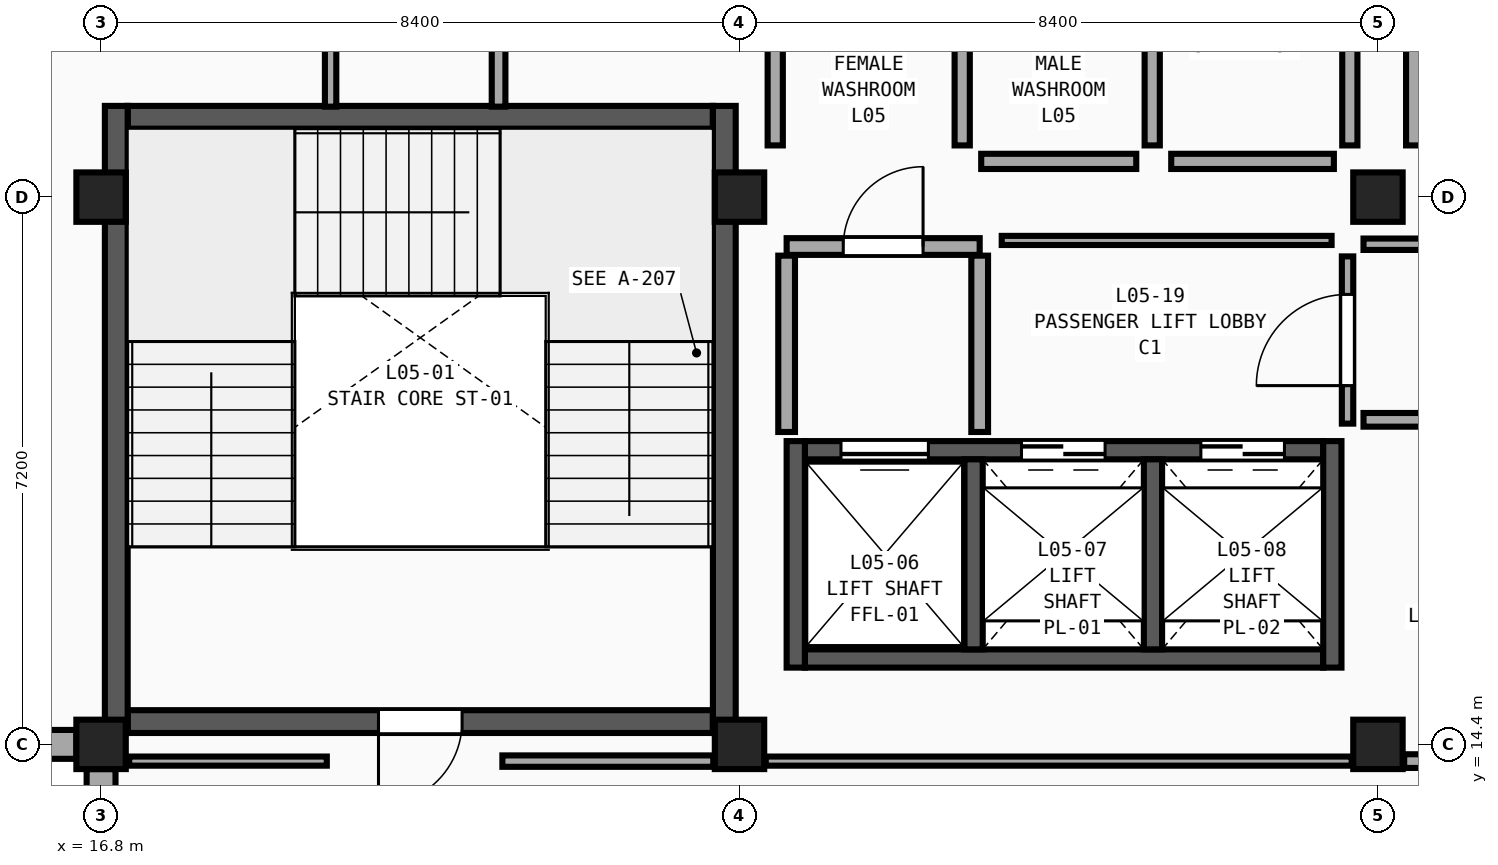
"""IFC4 building model, lengths in metres.
Left out: names, types, materials, properties, quantities, classifications, styles, units other than length and angle.
Written with IfcOpenShell. Run it as: python <this file> out.ifc"""

import sys

from ifc_helpers import new_model, si_unit, direction, frame, frame_2d, origin, origin_2d, place, context, subcontext, project, spatial, rectangle, extrude, element, fill, save


model = new_model("IFC4")
c1 = context("Model", 3, precision=1e-05, world=origin(), true_north=direction((0.0, 1.0)))
c2 = subcontext(c1, "Body", "Model", "MODEL_VIEW")
j1 = project(units=[si_unit("LENGTHUNIT", "METRE"), si_unit("PLANEANGLEUNIT", "RADIAN")], contexts=[c1])
p1 = place(None, origin())
s1 = spatial("IfcSite", under=j1, at=p1, CompositionType="ELEMENT")
p2 = place(p1, origin())
s2 = spatial("IfcBuilding", under=s1, at=p2, CompositionType="ELEMENT")
p3 = place(p2, frame((0.0, 0.0, 23.4)))
s3 = spatial("IfcBuildingStorey", under=s2, at=p3, CompositionType="ELEMENT", Elevation=23.4)
for number, where, z_axis, x_axis in (
    (1, (16.8, 14.4, 0.0), (0.0, 0.0, 1.0), (1.0, 0.0, 0.0)),
    (2, (16.8, 21.6, 0.0), (0.0, 0.0, 1.0), (1.0, 0.0, 0.0)),
    (3, (25.2, 14.4, 0.0), (0.0, 0.0, 1.0), (1.0, 0.0, 0.0)),
    (4, (25.2, 21.6, 0.0), (0.0, 0.0, 1.0), (1.0, 0.0, 0.0)),
    (5, (33.6, 14.4, 0.0), (0.0, 0.0, 1.0), (1.0, 0.0, 0.0)),
    (6, (33.6, 21.6, 0.0), (0.0, 0.0, 1.0), (1.0, 0.0, 0.0)),
):
    element("IfcColumn", number, at=place(p3, frame(where, z_axis=z_axis, x_axis=x_axis)), inside=s3, PredefinedType="COLUMN", context=c2, shape_type="SweptSolid", body=[
        extrude(rectangle(XDim=0.65, YDim=0.65, at=origin_2d()), origin(), (0.0, 0.0, 1.0), 4.5),
    ])
p4 = place(p3, frame((16.475, 14.4, 0.0), z_axis=(0.0, 0.0, 1.0), x_axis=(-1.0, 0.0, 0.0)))
e7 = element("IfcWall", 7, at=p4, inside=s3, PredefinedType="SOLIDWALL", context=c2, shape_type="SweptSolid", body=[
    extrude(rectangle(XDim=7.75, YDim=0.38, at=frame_2d((3.875, 0.0))), origin(), (0.0, 0.0, 1.0), 3.66),
])
p5 = place(p4, frame((1.37, 0.0, 0.75)))
e8 = element("IfcOpeningElement", 8, at=p5, cuts=e7, PredefinedType="OPENING", context=c2, shape_type="SweptSolid", body=[
    extrude(rectangle(XDim=1.6, YDim=1.9, at=frame_2d((0.8, 0.95))), frame((0.0, 0.21, 0.0), z_axis=(0.0, -1.0, 0.0), x_axis=(1.0, 0.0, 0.0)), (0.0, 0.0, 1.0), 0.42),
])
p6 = place(p4, frame((4.68, 0.0, 0.75)))
e9 = element("IfcOpeningElement", 9, at=p6, cuts=e7, PredefinedType="OPENING", context=c2, shape_type="SweptSolid", body=[
    extrude(rectangle(XDim=1.8, YDim=1.9, at=frame_2d((0.9, 0.95))), frame((0.0, 0.21, 0.0), z_axis=(0.0, -1.0, 0.0), x_axis=(1.0, 0.0, 0.0)), (0.0, 0.0, 1.0), 0.42),
])
p7 = place(p3, frame((16.8, 7.525, 0.0), z_axis=(0.0, 0.0, 1.0), x_axis=(0.0, 1.0, 0.0)))
e10 = element("IfcWall", 10, at=p7, inside=s3, PredefinedType="SOLIDWALL", context=c2, shape_type="SweptSolid", body=[
    extrude(rectangle(XDim=6.55, YDim=0.38, at=frame_2d((3.275, 0.0))), origin(), (0.0, 0.0, 1.0), 3.66),
])
p8 = place(p7, frame((1.034, 0.0, 0.75)))
e11 = element("IfcOpeningElement", 11, at=p8, cuts=e10, PredefinedType="OPENING", context=c2, shape_type="SweptSolid", body=[
    extrude(rectangle(XDim=1.6, YDim=2.08, at=frame_2d((0.8, 1.04))), frame((0.0, 0.21, 0.0), z_axis=(0.0, -1.0, 0.0), x_axis=(1.0, 0.0, 0.0)), (0.0, 0.0, 1.0), 0.42),
])
p9 = place(p7, frame((3.816, 0.0, 0.75)))
e12 = element("IfcOpeningElement", 12, at=p9, cuts=e10, PredefinedType="OPENING", context=c2, shape_type="SweptSolid", body=[
    extrude(rectangle(XDim=1.8, YDim=2.08, at=frame_2d((0.9, 1.04))), frame((0.0, 0.21, 0.0), z_axis=(0.0, -1.0, 0.0), x_axis=(1.0, 0.0, 0.0)), (0.0, 0.0, 1.0), 0.42),
])
p10 = place(p3, frame((24.85, 14.7, 0.0), z_axis=(0.0, 0.0, 1.0), x_axis=(-1.0, 0.0, 0.0)))
e13 = element("IfcWall", 13, at=p10, inside=s3, PredefinedType="SHEAR", context=c2, shape_type="SweptSolid", body=[
    extrude(rectangle(XDim=7.7, YDim=0.3, at=frame_2d((3.85, 0.0))), origin(), (0.0, 0.0, 1.0), 4.5),
])
p11 = place(p10, frame((3.3, 0.0, 0.0)))
e14 = element("IfcOpeningElement", 14, at=p11, cuts=e13, PredefinedType="OPENING", context=c2, shape_type="SweptSolid", body=[
    extrude(rectangle(XDim=1.1, YDim=2.2, at=frame_2d((0.55, 1.1))), frame((0.0, 0.17, 0.0), z_axis=(0.0, -1.0, 0.0), x_axis=(1.0, 0.0, 0.0)), (0.0, 0.0, 1.0), 0.34),
])
p12 = place(p3, frame((17.15, 22.65, 0.0), z_axis=(0.0, 0.0, 1.0), x_axis=(1.0, 0.0, 0.0)))
e15 = element("IfcWall", 15, at=p12, inside=s3, PredefinedType="SHEAR", context=c2, shape_type="SweptSolid", body=[
    extrude(rectangle(XDim=7.7, YDim=0.3, at=frame_2d((3.85, 0.0))), origin(), (0.0, 0.0, 1.0), 4.5),
])
for number, where, z_axis, x_axis in (
    (16, (17.0, 22.8, 0.0), (0.0, 0.0, 1.0), (0.0, -1.0, 0.0)),
    (17, (25.0, 14.55, 0.0), (0.0, 0.0, 1.0), (0.0, 1.0, 0.0)),
):
    element("IfcWall", number, at=place(p3, frame(where, z_axis=z_axis, x_axis=x_axis)), inside=s3, PredefinedType="SHEAR", context=c2, shape_type="SweptSolid", body=[
        extrude(rectangle(XDim=8.25, YDim=0.3, at=frame_2d((4.125, 0.0))), origin(), (0.0, 0.0, 1.0), 4.5),
    ])
p13 = place(p3, frame((32.88, 18.27, 0.0), z_axis=(0.0, 0.0, 1.0), x_axis=(-1.0, 0.0, 0.0)))
e18 = element("IfcWall", 18, at=p13, inside=s3, PredefinedType="SHEAR", context=c2, shape_type="SweptSolid", body=[
    extrude(rectangle(XDim=6.82, YDim=0.24, at=frame_2d((3.41, 0.0))), origin(), (0.0, 0.0, 1.0), 4.21),
])
p14 = place(p13, frame((5.195, 0.0, 0.0)))
e19 = element("IfcOpeningElement", 19, at=p14, cuts=e18, PredefinedType="OPENING", context=c2, shape_type="SweptSolid", body=[
    extrude(rectangle(XDim=1.15, YDim=2.25, at=frame_2d((0.575, 1.125))), frame((0.0, 0.14, 0.0), z_axis=(0.0, -1.0, 0.0), x_axis=(1.0, 0.0, 0.0)), (0.0, 0.0, 1.0), 0.28),
])
p15 = place(p13, frame((2.87, 0.0, 0.0)))
e20 = element("IfcOpeningElement", 20, at=p15, cuts=e18, PredefinedType="OPENING", context=c2, shape_type="SweptSolid", body=[
    extrude(rectangle(XDim=1.1, YDim=2.2, at=frame_2d((0.55, 1.1))), frame((0.0, 0.14, 0.0), z_axis=(0.0, -1.0, 0.0), x_axis=(1.0, 0.0, 0.0)), (0.0, 0.0, 1.0), 0.28),
])
p16 = place(p13, frame((0.51, 0.0, 0.0)))
e21 = element("IfcOpeningElement", 21, at=p16, cuts=e18, PredefinedType="OPENING", context=c2, shape_type="SweptSolid", body=[
    extrude(rectangle(XDim=1.1, YDim=2.2, at=frame_2d((0.55, 1.1))), frame((0.0, 0.14, 0.0), z_axis=(0.0, -1.0, 0.0), x_axis=(1.0, 0.0, 0.0)), (0.0, 0.0, 1.0), 0.28),
])
p17 = place(p3, frame((26.06, 15.53, 0.0), z_axis=(0.0, 0.0, 1.0), x_axis=(1.0, 0.0, 0.0)))
e22 = element("IfcWall", 22, at=p17, inside=s3, PredefinedType="SHEAR", context=c2, shape_type="SweptSolid", body=[
    extrude(rectangle(XDim=6.82, YDim=0.24, at=frame_2d((3.41, 0.0))), origin(), (0.0, 0.0, 1.0), 4.21),
])
for number, where, z_axis, x_axis in (
    (23, (25.94, 18.39, 0.0), (0.0, 0.0, 1.0), (0.0, -1.0, 0.0)),
    (24, (33.0, 15.41, 0.0), (0.0, 0.0, 1.0), (0.0, 1.0, 0.0)),
):
    element("IfcWall", number, at=place(p3, frame(where, z_axis=z_axis, x_axis=x_axis)), inside=s3, PredefinedType="SHEAR", context=c2, shape_type="SweptSolid", body=[
        extrude(rectangle(XDim=2.98, YDim=0.24, at=frame_2d((1.49, 0.0))), origin(), (0.0, 0.0, 1.0), 4.21),
    ])
for number, where, z_axis, x_axis in (
    (25, (28.28, 15.65, 0.0), (0.0, 0.0, 1.0), (0.0, 1.0, 0.0)),
    (26, (30.64, 15.65, 0.0), (0.0, 0.0, 1.0), (0.0, 1.0, 0.0)),
):
    element("IfcWall", number, at=place(p3, frame(where, z_axis=z_axis, x_axis=x_axis)), inside=s3, PredefinedType="SHEAR", context=c2, shape_type="SweptSolid", body=[
        extrude(rectangle(XDim=2.5, YDim=0.24, at=frame_2d((1.25, 0.0))), origin(), (0.0, 0.0, 1.0), 4.21),
    ])
p18 = place(p3, frame((25.82, 20.95, 0.0), z_axis=(0.0, 0.0, 1.0), x_axis=(1.0, 0.0, 0.0)))
e27 = element("IfcWall", 27, at=p18, inside=s3, PredefinedType="SOLIDWALL", context=c2, shape_type="SweptSolid", body=[
    extrude(rectangle(XDim=2.54, YDim=0.22, at=frame_2d((1.27, 0.0))), origin(), (0.0, 0.0, 1.0), 3.76),
])
p19 = place(p18, frame((0.745, 0.0, 0.0)))
e28 = element("IfcOpeningElement", 28, at=p19, cuts=e27, PredefinedType="OPENING", context=c2, shape_type="SweptSolid", body=[
    extrude(rectangle(XDim=1.05, YDim=2.15, at=frame_2d((0.525, 1.075))), frame((0.0, 0.13, 0.0), z_axis=(0.0, -1.0, 0.0), x_axis=(1.0, 0.0, 0.0)), (0.0, 0.0, 1.0), 0.26),
])
for number, where, z_axis, x_axis in (
    (29, (25.82, 18.51, 0.0), (0.0, 0.0, 1.0), (0.0, 1.0, 0.0)),
    (30, (28.36, 18.51, 0.0), (0.0, 0.0, 1.0), (0.0, 1.0, 0.0)),
):
    element("IfcWall", number, at=place(p3, frame(where, z_axis=z_axis, x_axis=x_axis)), inside=s3, PredefinedType="SOLIDWALL", context=c2, shape_type="SweptSolid", body=[
        extrude(rectangle(XDim=2.32, YDim=0.22, at=frame_2d((1.16, 0.0))), origin(), (0.0, 0.0, 1.0), 4.21),
    ])
p20 = place(p3, frame((22.08, 14.18, 0.0), z_axis=(0.0, 0.0, 1.0), x_axis=(1.0, 0.0, 0.0)))
e31 = element("IfcWall", 31, at=p20, inside=s3, PredefinedType="PARTITIONING", context=c2, shape_type="SweptSolid", body=[
    extrude(rectangle(XDim=2.775, YDim=0.15, at=frame_2d((1.387, 0.0))), origin(), (0.0, 0.0, 1.0), 3.76),
])
p21 = place(p3, frame((25.545, 14.18, 0.0), z_axis=(0.0, 0.0, 1.0), x_axis=(1.0, 0.0, 0.0)))
e32 = element("IfcWall", 32, at=p21, inside=s3, PredefinedType="PARTITIONING", context=c2, shape_type="SweptSolid", body=[
    extrude(rectangle(XDim=7.71, YDim=0.12, at=frame_2d((3.855, 0.0))), origin(), (0.0, 0.0, 1.0), 3.76),
])
p22 = place(p3, frame((33.945, 14.18, 0.0), z_axis=(0.0, 0.0, 1.0), x_axis=(1.0, 0.0, 0.0)))
e33 = element("IfcWall", 33, at=p22, inside=s3, PredefinedType="PARTITIONING", context=c2, shape_type="SweptSolid", body=[
    extrude(rectangle(XDim=2.625, YDim=0.18, at=frame_2d((1.312, 0.0))), origin(), (0.0, 0.0, 1.0), 3.76),
])
p23 = place(p22, frame((0.906, 0.0, 0.0)))
e34 = element("IfcOpeningElement", 34, at=p23, cuts=e33, PredefinedType="OPENING", context=c2, shape_type="SweptSolid", body=[
    extrude(rectangle(XDim=1.52, YDim=2.05, at=frame_2d((0.76, 1.025))), frame((0.0, 0.11, 0.0), z_axis=(0.0, -1.0, 0.0), x_axis=(1.0, 0.0, 0.0)), (0.0, 0.0, 1.0), 0.22),
])
p24 = place(p3, frame((28.65, 21.03, 0.0), z_axis=(0.0, 0.0, 1.0), x_axis=(1.0, 0.0, 0.0)))
e35 = element("IfcWall", 35, at=p24, inside=s3, PredefinedType="PARTITIONING", context=c2, shape_type="SweptSolid", body=[
    extrude(rectangle(XDim=4.34, YDim=0.12, at=frame_2d((2.17, 0.0))), origin(), (0.0, 0.0, 1.0), 3.76),
])
p25 = place(p3, frame((33.41, 18.67, 0.0), z_axis=(0.0, 0.0, 1.0), x_axis=(1.0, 0.0, 0.0)))
e36 = element("IfcWall", 36, at=p25, inside=s3, PredefinedType="PARTITIONING", context=c2, shape_type="SweptSolid", body=[
    extrude(rectangle(XDim=3.16, YDim=0.18, at=frame_2d((1.58, 0.0))), origin(), (0.0, 0.0, 1.0), 4.21),
])
p26 = place(p25, frame((0.82, 0.0, 0.0)))
e37 = element("IfcOpeningElement", 37, at=p26, cuts=e36, PredefinedType="OPENING", context=c2, shape_type="SweptSolid", body=[
    extrude(rectangle(XDim=1.52, YDim=2.21, at=frame_2d((0.76, 1.105))), frame((0.0, 0.11, 0.0), z_axis=(0.0, -1.0, 0.0), x_axis=(1.0, 0.0, 0.0)), (0.0, 0.0, 1.0), 0.22),
])
p27 = place(p3, frame((33.41, 20.98, 0.0), z_axis=(0.0, 0.0, 1.0), x_axis=(1.0, 0.0, 0.0)))
e38 = element("IfcWall", 38, at=p27, inside=s3, PredefinedType="PARTITIONING", context=c2, shape_type="SweptSolid", body=[
    extrude(rectangle(XDim=3.0, YDim=0.15, at=frame_2d((1.5, 0.0))), origin(), (0.0, 0.0, 1.0), 3.76),
])
p28 = place(p3, frame((17.17, 14.18, 0.0), z_axis=(0.0, 0.0, 1.0), x_axis=(1.0, 0.0, 0.0)))
e39 = element("IfcWall", 39, at=p28, inside=s3, PredefinedType="PARTITIONING", context=c2, shape_type="SweptSolid", body=[
    extrude(rectangle(XDim=2.6, YDim=0.12, at=frame_2d((1.3, 0.0))), origin(), (0.0, 0.0, 1.0), 3.76),
])
p29 = place(p3, frame((22.03, 22.79, 0.0), z_axis=(0.0, 0.0, 1.0), x_axis=(0.0, 1.0, 0.0)))
e40 = element("IfcWall", 40, at=p29, inside=s3, PredefinedType="PARTITIONING", context=c2, shape_type="SweptSolid", body=[
    extrude(rectangle(XDim=2.23, YDim=0.18, at=frame_2d((1.115, 0.0))), origin(), (0.0, 0.0, 1.0), 4.21),
])
p30 = place(p3, frame((33.2, 18.62, 0.0), z_axis=(0.0, 0.0, 1.0), x_axis=(0.0, 1.0, 0.0)))
e41 = element("IfcWall", 41, at=p30, inside=s3, PredefinedType="PARTITIONING", context=c2, shape_type="SweptSolid", body=[
    extrude(rectangle(XDim=2.2, YDim=0.15, at=frame_2d((1.1, 0.0))), origin(), (0.0, 0.0, 1.0), 3.76),
])
p31 = place(p30, frame((0.5, 0.0, 0.0)))
e42 = element("IfcOpeningElement", 42, at=p31, cuts=e41, PredefinedType="OPENING", context=c2, shape_type="SweptSolid", body=[
    extrude(rectangle(XDim=1.2, YDim=2.37, at=frame_2d((0.6, 1.185))), frame((0.0, 0.095, 0.0), z_axis=(0.0, -1.0, 0.0), x_axis=(1.0, 0.0, 0.0)), (0.0, 0.0, 1.0), 0.19),
])
p32 = place(p3, frame((19.82, 22.79, 0.0), z_axis=(0.0, 0.0, 1.0), x_axis=(0.0, 1.0, 0.0)))
e43 = element("IfcWall", 43, at=p32, inside=s3, PredefinedType="PARTITIONING", context=c2, shape_type="SweptSolid", body=[
    extrude(rectangle(XDim=2.07, YDim=0.15, at=frame_2d((1.035, 0.0))), origin(), (0.0, 0.0, 1.0), 4.21),
])
for number, where, z_axis, x_axis in (
    (44, (28.13, 22.28, 0.0), (0.0, 0.0, 1.0), (0.0, 1.0, 0.0)),
    (45, (25.67, 22.28, 0.0), (0.0, 0.0, 1.0), (0.0, 1.0, 0.0)),
    (46, (30.63, 22.28, 0.0), (0.0, 0.0, 1.0), (0.0, 1.0, 0.0)),
):
    element("IfcWall", number, at=place(p3, frame(where, z_axis=z_axis, x_axis=x_axis)), inside=s3, PredefinedType="PLUMBINGWALL", context=c2, shape_type="SweptSolid", body=[
        extrude(rectangle(XDim=2.59, YDim=0.2, at=frame_2d((1.295, 0.0))), origin(), (0.0, 0.0, 1.0), 4.21),
    ])
for number, where, z_axis, x_axis in (
    (47, (33.23, 22.28, 0.0), (0.0, 0.0, 1.0), (0.0, 1.0, 0.0)),
    (48, (34.07, 22.28, 0.0), (0.0, 0.0, 1.0), (0.0, 1.0, 0.0)),
):
    element("IfcWall", number, at=place(p3, frame(where, z_axis=z_axis, x_axis=x_axis)), inside=s3, PredefinedType="PLUMBINGWALL", context=c2, shape_type="SweptSolid", body=[
        extrude(rectangle(XDim=2.59, YDim=0.2, at=frame_2d((1.295, 0.0))), origin(), (0.0, 0.0, 1.0), 3.76),
    ])
p33 = place(p3, frame((30.88, 22.07, 0.0), z_axis=(0.0, 0.0, 1.0), x_axis=(1.0, 0.0, 0.0)))
e49 = element("IfcWall", 49, at=p33, inside=s3, PredefinedType="PLUMBINGWALL", context=c2, shape_type="SweptSolid", body=[
    extrude(rectangle(XDim=2.14, YDim=0.2, at=frame_2d((1.07, 0.0))), origin(), (0.0, 0.0, 1.0), 3.76),
])
p34 = place(p3, frame((28.38, 22.07, 0.0), z_axis=(0.0, 0.0, 1.0), x_axis=(1.0, 0.0, 0.0)))
e50 = element("IfcWall", 50, at=p34, inside=s3, PredefinedType="PLUMBINGWALL", context=c2, shape_type="SweptSolid", body=[
    extrude(rectangle(XDim=2.04, YDim=0.2, at=frame_2d((1.02, 0.0))), origin(), (0.0, 0.0, 1.0), 3.76),
])
p35 = place(p11, origin())
e51 = element("IfcDoor", 51, at=p35, inside=s3, OperationType="SINGLE_SWING_RIGHT", PredefinedType="DOOR", context=c2, shape_type="SweptSolid", body=[
    extrude(rectangle(XDim=1.1, YDim=2.2, at=frame_2d((0.55, 1.1))), frame((0.0, 0.025, 0.0), z_axis=(0.0, -1.0, 0.0), x_axis=(1.0, 0.0, 0.0)), (0.0, 0.0, 1.0), 0.05),
])
fill(e14, e51)
p36 = place(p14, origin())
e52 = element("IfcDoor", 52, at=p36, inside=s3, OperationType="SLIDING_TO_LEFT", PredefinedType="DOOR", context=c2, shape_type="SweptSolid", body=[
    extrude(rectangle(XDim=1.15, YDim=2.25, at=frame_2d((0.575, 1.125))), frame((0.0, 0.025, 0.0), z_axis=(0.0, -1.0, 0.0), x_axis=(1.0, 0.0, 0.0)), (0.0, 0.0, 1.0), 0.05),
])
fill(e19, e52)
p37 = place(p15, origin())
e53 = element("IfcDoor", 53, at=p37, inside=s3, OperationType="DOUBLE_DOOR_SLIDING", PredefinedType="DOOR", context=c2, shape_type="SweptSolid", body=[
    extrude(rectangle(XDim=1.1, YDim=2.2, at=frame_2d((0.55, 1.1))), frame((0.0, 0.025, 0.0), z_axis=(0.0, -1.0, 0.0), x_axis=(1.0, 0.0, 0.0)), (0.0, 0.0, 1.0), 0.05),
])
fill(e20, e53)
p38 = place(p16, origin())
e54 = element("IfcDoor", 54, at=p38, inside=s3, OperationType="DOUBLE_DOOR_SLIDING", PredefinedType="DOOR", context=c2, shape_type="SweptSolid", body=[
    extrude(rectangle(XDim=1.1, YDim=2.2, at=frame_2d((0.55, 1.1))), frame((0.0, 0.025, 0.0), z_axis=(0.0, -1.0, 0.0), x_axis=(1.0, 0.0, 0.0)), (0.0, 0.0, 1.0), 0.05),
])
fill(e21, e54)
p39 = place(p19, origin())
e55 = element("IfcDoor", 55, at=p39, inside=s3, OperationType="SINGLE_SWING_RIGHT", PredefinedType="DOOR", context=c2, shape_type="SweptSolid", body=[
    extrude(rectangle(XDim=1.05, YDim=2.15, at=frame_2d((0.525, 1.075))), frame((0.0, 0.025, 0.0), z_axis=(0.0, -1.0, 0.0), x_axis=(1.0, 0.0, 0.0)), (0.0, 0.0, 1.0), 0.05),
])
fill(e28, e55)
p40 = place(p31, origin())
e56 = element("IfcDoor", 56, at=p40, inside=s3, OperationType="SINGLE_SWING_LEFT", PredefinedType="DOOR", context=c2, shape_type="SweptSolid", body=[
    extrude(rectangle(XDim=1.2, YDim=2.37, at=frame_2d((0.6, 1.185))), frame((0.0, 0.025, 0.0), z_axis=(0.0, -1.0, 0.0), x_axis=(1.0, 0.0, 0.0)), (0.0, 0.0, 1.0), 0.05),
])
fill(e42, e56)
save(model, sys.argv[1])
